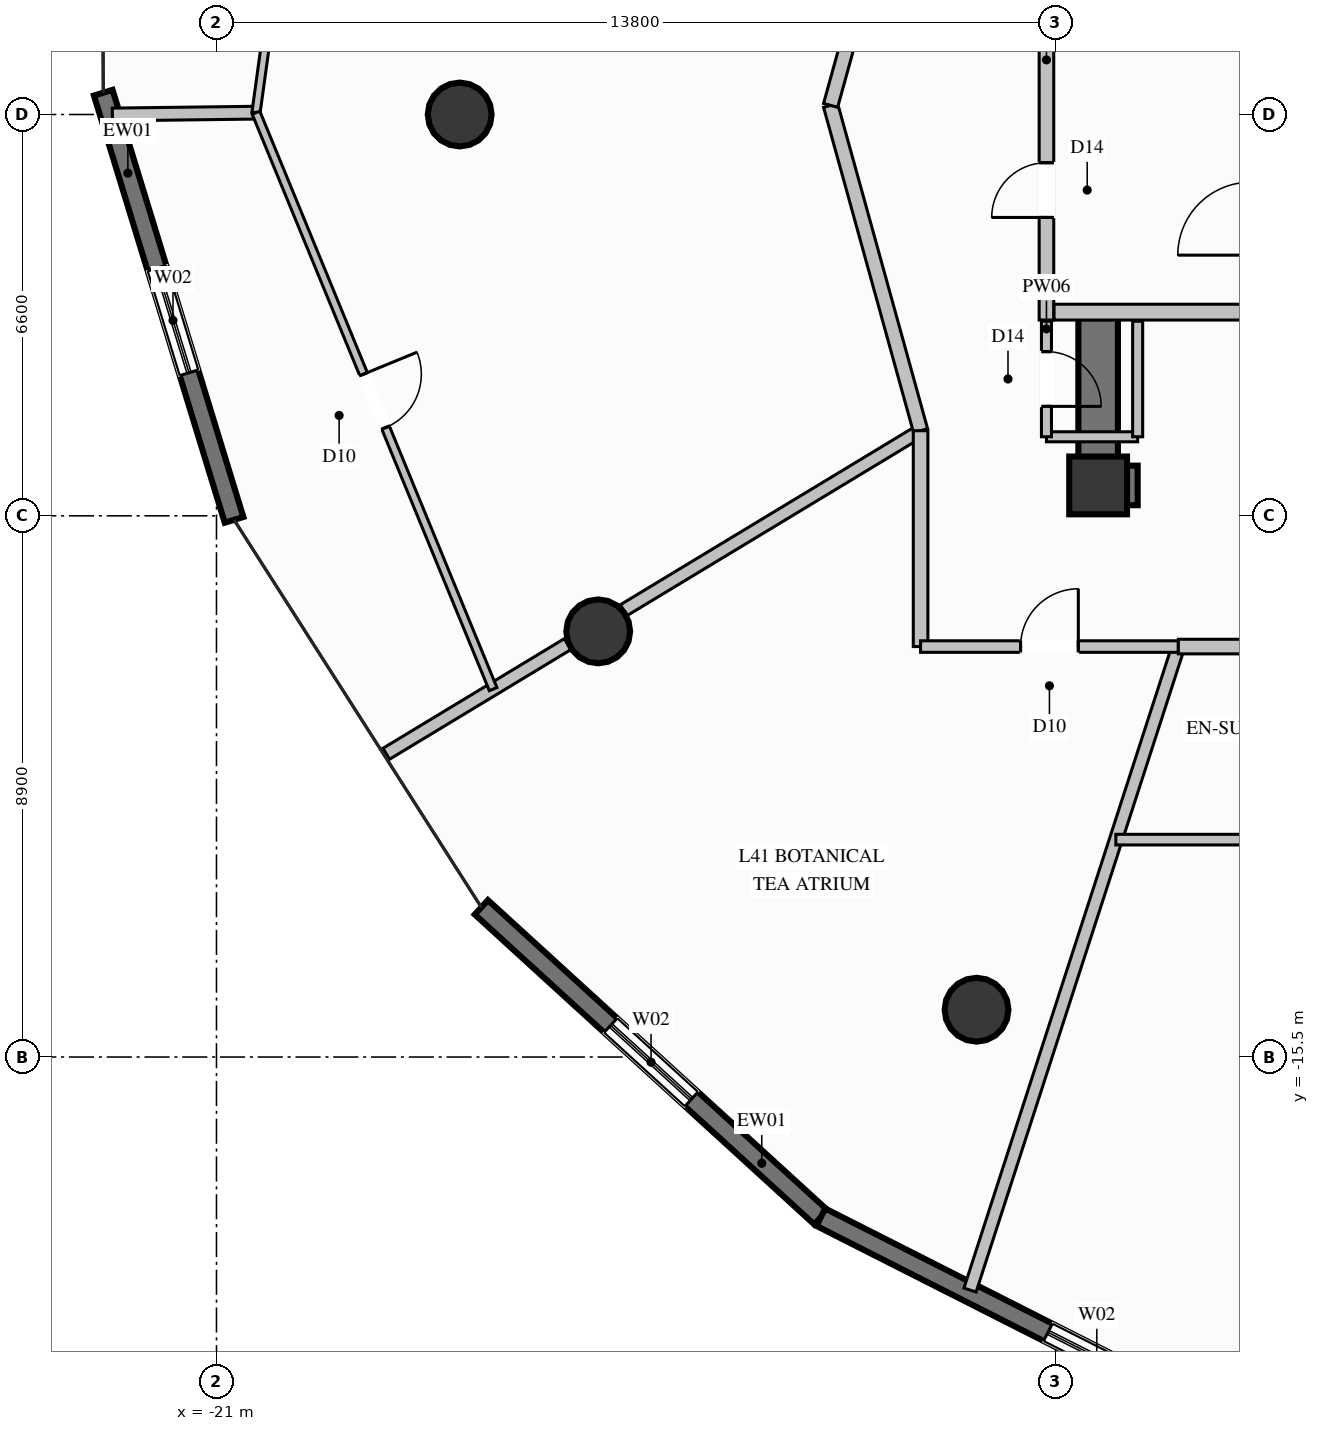
"""IFC4 building model, lengths in metres.
Left out: names, types, materials, properties, quantities, classifications, styles, units other than length and angle.
Written with IfcOpenShell. Run it as: python <this file> out.ifc"""

import sys

from ifc_helpers import new_model, si_unit, direction, frame, frame_2d, origin, origin_2d, place, context, subcontext, project, spatial, rectangle, circle, extrude, element, fill, save


model = new_model("IFC4")
c1 = context("Model", 3, precision=1e-05, world=origin(), true_north=direction((0.0, 1.0)))
c2 = subcontext(c1, "Body", "Model", "MODEL_VIEW")
j1 = project(units=[si_unit("LENGTHUNIT", "METRE"), si_unit("PLANEANGLEUNIT", "RADIAN")], contexts=[c1])
p1 = place(None, origin())
s1 = spatial("IfcSite", under=j1, at=p1, CompositionType="ELEMENT")
p2 = place(p1, origin())
s2 = spatial("IfcBuilding", under=s1, at=p2, CompositionType="ELEMENT")
p3 = place(p2, frame((0.0, 0.0, 160.2)))
s3 = spatial("IfcBuildingStorey", under=s2, at=p3, CompositionType="ELEMENT", Elevation=160.2)
p4 = place(p3, frame((-6.5, -6.1, 0.0), z_axis=(0.0, 0.0, 1.0), x_axis=(1.0, 0.0, 0.0)))
e1 = element("IfcColumn", 1, at=p4, inside=s3, PredefinedType="COLUMN", context=c2, shape_type="SweptSolid", body=[
    extrude(rectangle(XDim=0.95, YDim=0.95, at=origin_2d()), origin(), (0.0, 0.0, 1.0), 3.6),
])
p5 = place(p3, frame((-6.175, -6.1, 0.0), z_axis=(0.0, 0.0, 1.0), x_axis=(1.0, 0.0, 0.0)))
e2 = element("IfcWall", 2, at=p5, inside=s3, PredefinedType="SHEAR", context=c2, shape_type="SweptSolid", body=[
    extrude(rectangle(XDim=0.325, YDim=0.65, at=frame_2d((0.163, 0.0))), origin(), (0.0, 0.0, 1.0), 3.6),
])
p6 = place(p3, frame((-6.5, -6.425, 0.0), z_axis=(0.0, 0.0, 1.0), x_axis=(0.0, 1.0, 0.0)))
e3 = element("IfcWall", 3, at=p6, inside=s3, PredefinedType="SHEAR", context=c2, shape_type="SweptSolid", body=[
    extrude(rectangle(XDim=3.075, YDim=0.65, at=frame_2d((1.538, 0.0))), origin(), (0.0, 0.0, 1.0), 3.6),
])
for number, where, z_axis, x_axis in (
    (4, (-17.0, 0.0, 0.0), (0.0, 0.0, 1.0), (1.0, 0.0, 0.0)),
    (5, (-14.722, -8.5, 0.0), (0.0, 0.0, 1.0), (1.0, 0.0, 0.0)),
    (6, (-8.5, -14.722, 0.0), (0.0, 0.0, 1.0), (1.0, 0.0, 0.0)),
):
    element("IfcColumn", number, at=place(p3, frame(where, z_axis=z_axis, x_axis=x_axis)), inside=s3, PredefinedType="COLUMN", context=c2, shape_type="SweptSolid", body=[
        extrude(circle(Radius=0.525, at=origin_2d()), origin(), (0.0, 0.0, 1.0), 3.6),
    ])
p7 = place(p3, frame((-20.711, -6.666, 0.0), z_axis=(0.0, 0.0, 1.0), x_axis=(-0.292831477481, 0.956164068451, 0.0)))
e7 = element("IfcWall", 7, at=p7, inside=s3, PredefinedType="SOLIDWALL", context=c2, shape_type="SweptSolid", body=[
    extrude(rectangle(XDim=7.346, YDim=0.32, at=frame_2d((3.673, 0.0))), origin(), (0.0, 0.0, 1.0), 3.2),
])
p8 = place(p7, frame((2.53, 0.0, 0.35)))
e8 = element("IfcOpeningElement", 8, at=p8, cuts=e7, PredefinedType="OPENING", context=c2, shape_type="SweptSolid", body=[
    extrude(rectangle(XDim=1.8, YDim=2.6, at=frame_2d((0.9, 1.3))), frame((0.0, 0.17, 0.0), z_axis=(0.0, -1.0, 0.0), x_axis=(1.0, 0.0, 0.0)), (0.0, 0.0, 1.0), 0.34),
])
p9 = place(p3, frame((-11.061, -18.134, 0.0), z_axis=(0.0, 0.0, 1.0), x_axis=(-0.738589670995, 0.674155247624, 0.0)))
e9 = element("IfcWall", 9, at=p9, inside=s3, PredefinedType="SOLIDWALL", context=c2, shape_type="SweptSolid", body=[
    extrude(rectangle(XDim=7.559, YDim=0.32, at=frame_2d((3.78, 0.0))), origin(), (0.0, 0.0, 1.0), 3.2),
])
p10 = place(p9, frame((2.88, 0.0, 0.35)))
e10 = element("IfcOpeningElement", 10, at=p10, cuts=e9, PredefinedType="OPENING", context=c2, shape_type="SweptSolid", body=[
    extrude(rectangle(XDim=1.8, YDim=2.6, at=frame_2d((0.9, 1.3))), frame((0.0, 0.17, 0.0), z_axis=(0.0, -1.0, 0.0), x_axis=(1.0, 0.0, 0.0)), (0.0, 0.0, 1.0), 0.34),
])
p11 = place(p3, frame((-4.508, -21.454, 0.0), z_axis=(0.0, 0.0, 1.0), x_axis=(-0.892041671527, 0.451953157151, 0.0)))
e11 = element("IfcWall", 11, at=p11, inside=s3, PredefinedType="SOLIDWALL", context=c2, shape_type="SweptSolid", body=[
    extrude(rectangle(XDim=7.346, YDim=0.32, at=frame_2d((3.673, 0.0))), origin(), (0.0, 0.0, 1.0), 3.2),
])
p12 = place(p11, frame((1.358, 0.0, 0.35)))
e12 = element("IfcOpeningElement", 12, at=p12, cuts=e11, PredefinedType="OPENING", context=c2, shape_type="SweptSolid", body=[
    extrude(rectangle(XDim=1.8, YDim=2.6, at=frame_2d((0.9, 1.3))), frame((0.0, 0.17, 0.0), z_axis=(0.0, -1.0, 0.0), x_axis=(1.0, 0.0, 0.0)), (0.0, 0.0, 1.0), 0.34),
])
p13 = place(p3, frame((-7.35, -3.38, 0.0), z_axis=(0.0, 0.0, 1.0), x_axis=(0.0, 1.0, 0.0)))
e13 = element("IfcWall", 13, at=p13, inside=s3, PredefinedType="PARTITIONING", context=c2, shape_type="SweptSolid", body=[
    extrude(rectangle(XDim=5.72, YDim=0.24, at=frame_2d((2.86, 0.0))), origin(), (0.0, 0.0, 1.0), 3.2),
])
p14 = place(p13, frame((1.687, 0.0, 0.0)))
e14 = element("IfcOpeningElement", 14, at=p14, cuts=e13, PredefinedType="OPENING", context=c2, shape_type="SweptSolid", body=[
    extrude(rectangle(XDim=0.9, YDim=2.02, at=frame_2d((0.45, 1.01))), frame((0.0, 0.13, 0.0), z_axis=(0.0, -1.0, 0.0), x_axis=(1.0, 0.0, 0.0)), (0.0, 0.0, 1.0), 0.26),
])
p15 = place(p3, frame((-7.225, -3.25, 0.0), z_axis=(0.0, 0.0, 1.0), x_axis=(1.0, 0.0, 0.0)))
e15 = element("IfcWall", 15, at=p15, inside=s3, PredefinedType="PARTITIONING", context=c2, shape_type="SweptSolid", body=[
    extrude(rectangle(XDim=3.095, YDim=0.26, at=frame_2d((1.548, 0.0))), origin(), (0.0, 0.0, 1.0), 3.2),
])
p16 = place(p3, frame((-7.35, -5.3, 0.0), z_axis=(0.0, 0.0, 1.0), x_axis=(1.0, 0.0, 0.0)))
e16 = element("IfcWall", 16, at=p16, inside=s3, PredefinedType="PARTITIONING", context=c2, shape_type="SweptSolid", body=[
    extrude(rectangle(XDim=1.5, YDim=0.165, at=frame_2d((0.75, 0.0))), origin(), (0.0, 0.0, 1.0), 3.2),
])
p17 = place(p3, frame((-5.85, -5.3, 0.0), z_axis=(0.0, 0.0, 1.0), x_axis=(0.0, 1.0, 0.0)))
e17 = element("IfcWall", 17, at=p17, inside=s3, PredefinedType="PARTITIONING", context=c2, shape_type="SweptSolid", body=[
    extrude(rectangle(XDim=1.9, YDim=0.165, at=frame_2d((0.95, 0.0))), origin(), (0.0, 0.0, 1.0), 2.067),
])
p18 = place(p3, frame((-7.35, -3.4, 0.0), z_axis=(0.0, 0.0, 1.0), x_axis=(0.0, -1.0, 0.0)))
e18 = element("IfcWall", 18, at=p18, inside=s3, PredefinedType="PARTITIONING", context=c2, shape_type="SweptSolid", body=[
    extrude(rectangle(XDim=1.9, YDim=0.165, at=frame_2d((0.95, 0.0))), origin(), (0.0, 0.0, 1.0), 3.2),
])
p19 = place(p18, frame((0.5, 0.0, 0.0)))
e19 = element("IfcOpeningElement", 19, at=p19, cuts=e18, PredefinedType="OPENING", context=c2, shape_type="SweptSolid", body=[
    extrude(rectangle(XDim=0.9, YDim=2.02, at=frame_2d((0.45, 1.01))), frame((0.0, 0.093, 0.0), z_axis=(0.0, -1.0, 0.0), x_axis=(1.0, 0.0, 0.0)), (0.0, 0.0, 1.0), 0.185),
])
p20 = place(p3, frame((-9.42, -5.2, 0.0), z_axis=(0.0, 0.0, 1.0), x_axis=(-0.855762821872, -0.517368333687, 0.0)))
e20 = element("IfcWall", 20, at=p20, inside=s3, PredefinedType="PARTITIONING", context=c2, shape_type="SweptSolid", body=[
    extrude(rectangle(XDim=5.706, YDim=0.21, at=frame_2d((2.853, 0.0))), origin(), (0.0, 0.0, 1.0), 2.067),
])
p21 = place(p3, frame((-15.225, -8.71, 0.0), z_axis=(0.0, 0.0, 1.0), x_axis=(-0.855813475179, -0.517284540366, 0.0)))
e21 = element("IfcWall", 21, at=p21, inside=s3, PredefinedType="PARTITIONING", context=c2, shape_type="SweptSolid", body=[
    extrude(rectangle(XDim=3.485, YDim=0.21, at=frame_2d((1.743, 0.0))), origin(), (0.0, 0.0, 1.0), 3.2),
])
p22 = place(p3, frame((-20.35, 0.03, 0.0), z_axis=(0.0, 0.0, 1.0), x_axis=(-0.99991918064, -0.012713464877, 0.0)))
e22 = element("IfcWall", 22, at=p22, inside=s3, PredefinedType="PARTITIONING", context=c2, shape_type="SweptSolid", body=[
    extrude(rectangle(XDim=2.362, YDim=0.21, at=frame_2d((1.181, 0.0))), origin(), (0.0, 0.0, 1.0), 3.2),
])
p23 = place(p3, frame((-10.9, 0.15, 0.0), z_axis=(0.0, 0.0, 1.0), x_axis=(0.266625172958, -0.963800299411, 0.0)))
e23 = element("IfcWall", 23, at=p23, inside=s3, PredefinedType="PARTITIONING", context=c2, shape_type="SweptSolid", body=[
    extrude(rectangle(XDim=5.551, YDim=0.24, at=frame_2d((2.775, 0.0))), origin(), (0.0, 0.0, 1.0), 3.2),
])
p24 = place(p3, frame((-10.042, 3.253, 0.0), z_axis=(0.0, 0.0, 1.0), x_axis=(-0.266478138733, -0.963840962803, 0.0)))
e24 = element("IfcWall", 24, at=p24, inside=s3, PredefinedType="PARTITIONING", context=c2, shape_type="SweptSolid", body=[
    extrude(rectangle(XDim=3.219, YDim=0.24, at=frame_2d((1.61, 0.0))), origin(), (0.0, 0.0, 1.0), 3.2),
])
p25 = place(p24, frame((1.06, 0.0, 0.0)))
e25 = element("IfcOpeningElement", 25, at=p25, cuts=e24, PredefinedType="OPENING", context=c2, shape_type="SweptSolid", body=[
    extrude(rectangle(XDim=1.1, YDim=2.3, at=frame_2d((0.55, 1.15))), frame((0.0, 0.13, 0.0), z_axis=(0.0, -1.0, 0.0), x_axis=(1.0, 0.0, 0.0)), (0.0, 0.0, 1.0), 0.26),
])
p26 = place(p3, frame((-18.849, 10.895, 0.0), z_axis=(0.0, 0.0, 1.0), x_axis=(-0.136848296062, -0.990592016859, 0.0)))
e26 = element("IfcWall", 26, at=p26, inside=s3, PredefinedType="PARTITIONING", context=c2, shape_type="SweptSolid", body=[
    extrude(rectangle(XDim=10.968, YDim=0.135, at=frame_2d((5.484, 0.0))), origin(), (0.0, 0.0, 1.0), 3.2),
])
p27 = place(p26, frame((5.009, 0.0, 0.0)))
e27 = element("IfcOpeningElement", 27, at=p27, cuts=e26, PredefinedType="OPENING", context=c2, shape_type="SweptSolid", body=[
    extrude(rectangle(XDim=0.95, YDim=2.1, at=frame_2d((0.475, 1.05))), frame((0.0, 0.078, 0.0), z_axis=(0.0, -1.0, 0.0), x_axis=(1.0, 0.0, 0.0)), (0.0, 0.0, 1.0), 0.155),
])
p28 = place(p3, frame((-20.35, 0.03, 0.0), z_axis=(0.0, 0.0, 1.0), x_axis=(0.380468288076, -0.924793967199, 0.0)))
e28 = element("IfcWall", 28, at=p28, inside=s3, PredefinedType="PARTITIONING", context=c2, shape_type="SweptSolid", body=[
    extrude(rectangle(XDim=10.251, YDim=0.135, at=frame_2d((5.125, 0.0))), origin(), (0.0, 0.0, 1.0), 3.2),
])
p29 = place(p28, frame((4.65, 0.0, 0.0)))
e29 = element("IfcOpeningElement", 29, at=p29, cuts=e28, PredefinedType="OPENING", context=c2, shape_type="SweptSolid", body=[
    extrude(rectangle(XDim=0.95, YDim=2.1, at=frame_2d((0.475, 1.05))), frame((0.0, 0.078, 0.0), z_axis=(0.0, -1.0, 0.0), x_axis=(1.0, 0.0, 0.0)), (0.0, 0.0, 1.0), 0.155),
])
p30 = place(p3, frame((-5.181, -8.75, 0.0), z_axis=(0.0, 0.0, 1.0), x_axis=(-0.308017807396, -0.951380591733, 0.0)))
e30 = element("IfcWall", 30, at=p30, inside=s3, PredefinedType="PARTITIONING", context=c2, shape_type="SweptSolid", body=[
    extrude(rectangle(XDim=11.123, YDim=0.21, at=frame_2d((5.562, 0.0))), origin(), (0.0, 0.0, 1.0), 2.067),
])
p31 = place(p3, frame((-9.42, -5.2, 0.0), z_axis=(0.0, 0.0, 1.0), x_axis=(0.0, -1.0, 0.0)))
e31 = element("IfcWall", 31, at=p31, inside=s3, PredefinedType="PARTITIONING", context=c2, shape_type="SweptSolid", body=[
    extrude(rectangle(XDim=3.55, YDim=0.24, at=frame_2d((1.775, 0.0))), origin(), (0.0, 0.0, 1.0), 3.2),
])
p32 = place(p3, frame((-9.42, -8.75, 0.0), z_axis=(0.0, 0.0, 1.0), x_axis=(1.0, 0.0, 0.0)))
e32 = element("IfcWall", 32, at=p32, inside=s3, PredefinedType="PARTITIONING", context=c2, shape_type="SweptSolid", body=[
    extrude(rectangle(XDim=4.239, YDim=0.19, at=frame_2d((2.12, 0.0))), origin(), (0.0, 0.0, 1.0), 3.2),
])
p33 = place(p32, frame((1.644, 0.0, 0.0)))
e33 = element("IfcOpeningElement", 33, at=p33, cuts=e32, PredefinedType="OPENING", context=c2, shape_type="SweptSolid", body=[
    extrude(rectangle(XDim=0.95, YDim=2.1, at=frame_2d((0.475, 1.05))), frame((0.0, 0.105, 0.0), z_axis=(0.0, -1.0, 0.0), x_axis=(1.0, 0.0, 0.0)), (0.0, 0.0, 1.0), 0.21),
])
p34 = place(p3, frame((-5.181, -8.75, 0.0), z_axis=(0.0, 0.0, 1.0), x_axis=(1.0, 0.0, 0.0)))
e34 = element("IfcWall", 34, at=p34, inside=s3, PredefinedType="PARTITIONING", context=c2, shape_type="SweptSolid", body=[
    extrude(rectangle(XDim=5.181, YDim=0.24, at=frame_2d((2.59, 0.0))), origin(), (0.0, 0.0, 1.0), 3.2),
])
p35 = place(p3, frame((-6.209, -11.925, 0.0), z_axis=(0.0, 0.0, 1.0), x_axis=(1.0, 0.0, 0.0)))
e35 = element("IfcWall", 35, at=p35, inside=s3, PredefinedType="PLUMBINGWALL", context=c2, shape_type="SweptSolid", body=[
    extrude(rectangle(XDim=6.209, YDim=0.175, at=frame_2d((3.104, 0.0))), origin(), (0.0, 0.0, 1.0), 3.2),
])
p36 = place(p8, origin())
e36 = element("IfcWindow", 36, at=p36, inside=s3, PartitioningType="SINGLE_PANEL", PredefinedType="WINDOW", context=c2, shape_type="SweptSolid", body=[
    extrude(rectangle(XDim=1.8, YDim=2.6, at=frame_2d((0.9, 1.3))), frame((0.0, 0.03, 0.0), z_axis=(0.0, -1.0, 0.0), x_axis=(1.0, 0.0, 0.0)), (0.0, 0.0, 1.0), 0.06),
])
fill(e8, e36)
p37 = place(p10, origin())
e37 = element("IfcWindow", 37, at=p37, inside=s3, PartitioningType="SINGLE_PANEL", PredefinedType="WINDOW", context=c2, shape_type="SweptSolid", body=[
    extrude(rectangle(XDim=1.8, YDim=2.6, at=frame_2d((0.9, 1.3))), frame((0.0, 0.03, 0.0), z_axis=(0.0, -1.0, 0.0), x_axis=(1.0, 0.0, 0.0)), (0.0, 0.0, 1.0), 0.06),
])
fill(e10, e37)
p38 = place(p12, origin())
e38 = element("IfcWindow", 38, at=p38, inside=s3, PartitioningType="SINGLE_PANEL", PredefinedType="WINDOW", context=c2, shape_type="SweptSolid", body=[
    extrude(rectangle(XDim=1.8, YDim=2.6, at=frame_2d((0.9, 1.3))), frame((0.0, 0.03, 0.0), z_axis=(0.0, -1.0, 0.0), x_axis=(1.0, 0.0, 0.0)), (0.0, 0.0, 1.0), 0.06),
])
fill(e12, e38)
p39 = place(p14, origin())
e39 = element("IfcDoor", 39, at=p39, inside=s3, OperationType="SINGLE_SWING_LEFT", PredefinedType="DOOR", context=c2, shape_type="SweptSolid", body=[
    extrude(rectangle(XDim=0.9, YDim=2.02, at=frame_2d((0.45, 1.01))), frame((0.0, 0.025, 0.0), z_axis=(0.0, -1.0, 0.0), x_axis=(1.0, 0.0, 0.0)), (0.0, 0.0, 1.0), 0.05),
])
fill(e14, e39)
p40 = place(p19, origin())
e40 = element("IfcDoor", 40, at=p40, inside=s3, OperationType="SINGLE_SWING_RIGHT", PredefinedType="DOOR", context=c2, shape_type="SweptSolid", body=[
    extrude(rectangle(XDim=0.9, YDim=2.02, at=frame_2d((0.45, 1.01))), frame((0.0, 0.025, 0.0), z_axis=(0.0, -1.0, 0.0), x_axis=(1.0, 0.0, 0.0)), (0.0, 0.0, 1.0), 0.05),
])
fill(e19, e40)
p41 = place(p29, origin())
e41 = element("IfcDoor", 41, at=p41, inside=s3, OperationType="SINGLE_SWING_LEFT", PredefinedType="DOOR", context=c2, shape_type="SweptSolid", body=[
    extrude(rectangle(XDim=0.95, YDim=2.1, at=frame_2d((0.475, 1.05))), frame((0.0, 0.025, 0.0), z_axis=(0.0, -1.0, 0.0), x_axis=(1.0, 0.0, 0.0)), (0.0, 0.0, 1.0), 0.05),
])
fill(e29, e41)
p42 = place(p33, origin())
e42 = element("IfcDoor", 42, at=p42, inside=s3, OperationType="SINGLE_SWING_RIGHT", PredefinedType="DOOR", context=c2, shape_type="SweptSolid", body=[
    extrude(rectangle(XDim=0.95, YDim=2.1, at=frame_2d((0.475, 1.05))), frame((0.0, 0.025, 0.0), z_axis=(0.0, -1.0, 0.0), x_axis=(1.0, 0.0, 0.0)), (0.0, 0.0, 1.0), 0.05),
])
fill(e33, e42)
save(model, sys.argv[1])
